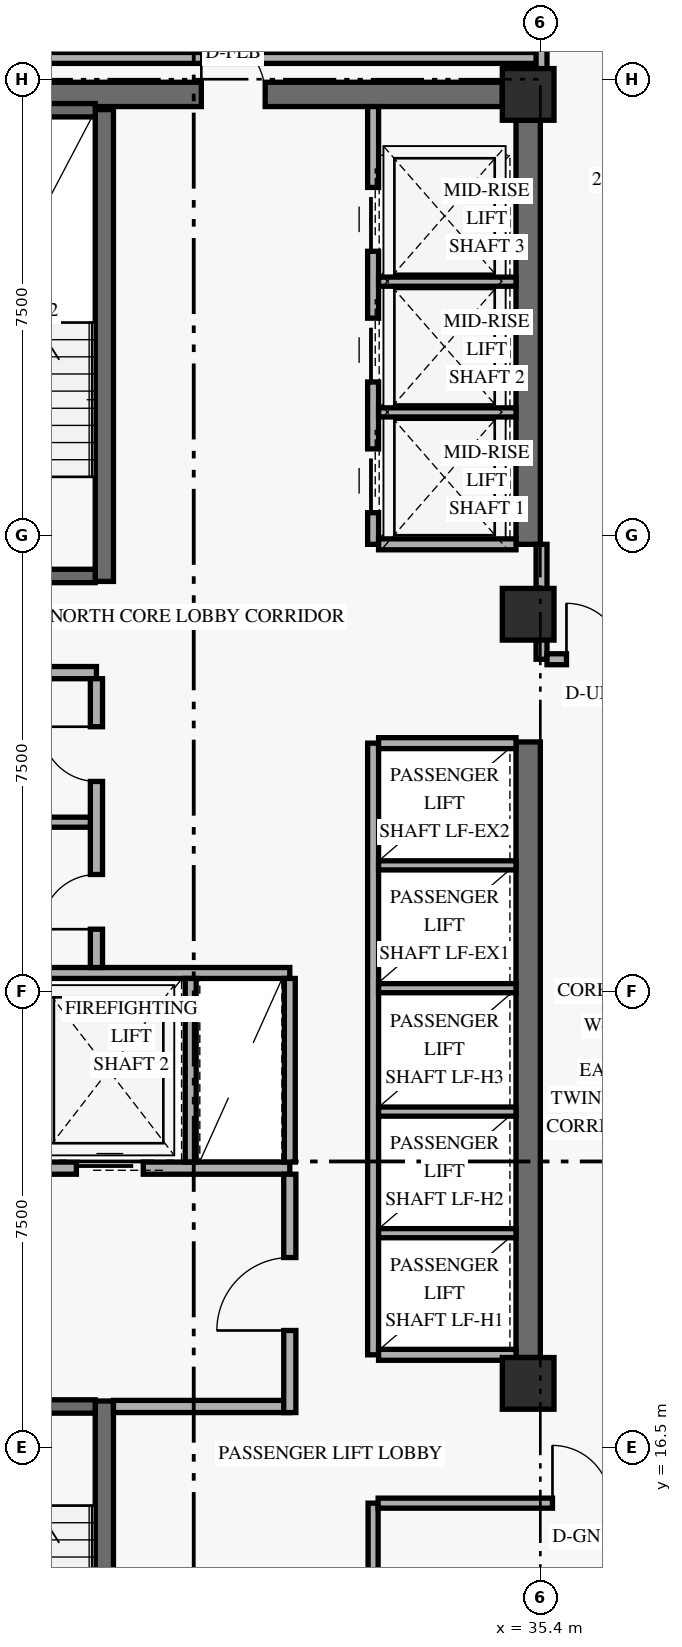
"""IFC4 building model, lengths in metres.
Left out: names, types, materials, properties, quantities, classifications, styles, units other than length and angle.
Written with IfcOpenShell. Run it as: python <this file> out.ifc"""

import sys

from ifc_helpers import new_model, si_unit, direction, frame, frame_2d, origin, origin_2d, place, context, subcontext, project, spatial, rectangle, extrude, element, fill, save


model = new_model("IFC4")
c1 = context("Model", 3, precision=1e-05, world=origin(), true_north=direction((0.0, 1.0)))
c2 = subcontext(c1, "Body", "Model", "MODEL_VIEW")
j1 = project(units=[si_unit("LENGTHUNIT", "METRE"), si_unit("PLANEANGLEUNIT", "RADIAN")], contexts=[c1])
p1 = place(None, origin())
s1 = spatial("IfcSite", under=j1, at=p1, CompositionType="ELEMENT")
p2 = place(p1, origin())
s2 = spatial("IfcBuilding", under=s1, at=p2, CompositionType="ELEMENT")
p3 = place(p2, frame((0.0, 0.0, 132.0)))
s3 = spatial("IfcBuildingStorey", under=s2, at=p3, CompositionType="ELEMENT", Elevation=132.0)
p4 = place(p3, frame((35.2, 17.975, 0.0), z_axis=(0.0, 0.0, 1.0), x_axis=(0.0, 1.0, 0.0)))
e1 = element("IfcWall", 1, at=p4, inside=s3, PredefinedType="SHEAR", context=c2, shape_type="SweptSolid", body=[
    extrude(rectangle(XDim=10.125, YDim=0.4, at=frame_2d((5.062, 0.0))), origin(), (0.0, 0.0, 1.0), 2.689),
])
p5 = place(p3, frame((35.2, 31.35, 0.0), z_axis=(0.0, 0.0, 1.0), x_axis=(0.0, 1.0, 0.0)))
e2 = element("IfcWall", 2, at=p5, inside=s3, PredefinedType="SHEAR", context=c2, shape_type="SweptSolid", body=[
    extrude(rectangle(XDim=6.975, YDim=0.4, at=frame_2d((3.487, 0.0))), origin(), (0.0, 0.0, 1.0), 2.689),
])
p6 = place(p3, frame((24.625, 38.75, 0.0), z_axis=(0.0, 0.0, 1.0), x_axis=(1.0, 0.0, 0.0)))
e3 = element("IfcWall", 3, at=p6, inside=s3, PredefinedType="SHEAR", context=c2, shape_type="SweptSolid", body=[
    extrude(rectangle(XDim=10.15, YDim=0.4, at=frame_2d((5.075, 0.0))), origin(), (0.0, 0.0, 1.0), 3.3),
])
p7 = place(p6, frame((5.2, 0.0, 0.0)))
e4 = element("IfcOpeningElement", 4, at=p7, cuts=e3, PredefinedType="OPENING", context=c2, shape_type="SweptSolid", body=[
    extrude(rectangle(XDim=1.05, YDim=2.15, at=frame_2d((0.525, 1.075))), frame((0.0, 0.21, 0.0), z_axis=(0.0, -1.0, 0.0), x_axis=(1.0, 0.0, 0.0)), (0.0, 0.0, 1.0), 0.42),
])
p8 = place(p3, frame((28.23, 9.5, 0.0), z_axis=(0.0, 0.0, 1.0), x_axis=(0.0, 1.0, 0.0)))
e5 = element("IfcWall", 5, at=p8, inside=s3, PredefinedType="SHEAR", context=c2, shape_type="SweptSolid", body=[
    extrude(rectangle(XDim=7.76, YDim=0.3, at=frame_2d((3.88, 0.0))), origin(), (0.0, 0.0, 1.0), 3.3),
])
p9 = place(p3, frame((24.92, 17.17, 0.0), z_axis=(0.0, 0.0, 1.0), x_axis=(1.0, 0.0, 0.0)))
e6 = element("IfcWall", 6, at=p9, inside=s3, PredefinedType="SHEAR", context=c2, shape_type="SweptSolid", body=[
    extrude(rectangle(XDim=3.16, YDim=0.22, at=frame_2d((1.58, 0.0))), origin(), (0.0, 0.0, 1.0), 3.3),
])
p10 = place(p9, frame((0.78, 0.0, 0.0)))
e7 = element("IfcOpeningElement", 7, at=p10, cuts=e6, PredefinedType="OPENING", context=c2, shape_type="SweptSolid", body=[
    extrude(rectangle(XDim=1.05, YDim=2.15, at=frame_2d((0.525, 1.075))), frame((0.0, 0.12, 0.0), z_axis=(0.0, -1.0, 0.0), x_axis=(1.0, 0.0, 0.0)), (0.0, 0.0, 1.0), 0.24),
])
p11 = place(p3, frame((28.23, 30.74, 0.0), z_axis=(0.0, 0.0, 1.0), x_axis=(0.0, 1.0, 0.0)))
e8 = element("IfcWall", 8, at=p11, inside=s3, PredefinedType="SHEAR", context=c2, shape_type="SweptSolid", body=[
    extrude(rectangle(XDim=7.76, YDim=0.3, at=frame_2d((3.88, 0.0))), origin(), (0.0, 0.0, 1.0), 3.3),
])
p12 = place(p3, frame((24.92, 30.83, 0.0), z_axis=(0.0, 0.0, 1.0), x_axis=(1.0, 0.0, 0.0)))
e9 = element("IfcWall", 9, at=p12, inside=s3, PredefinedType="SHEAR", context=c2, shape_type="SweptSolid", body=[
    extrude(rectangle(XDim=3.16, YDim=0.22, at=frame_2d((1.58, 0.0))), origin(), (0.0, 0.0, 1.0), 3.3),
])
p13 = place(p12, frame((0.78, 0.0, 0.0)))
e10 = element("IfcOpeningElement", 10, at=p13, cuts=e9, PredefinedType="OPENING", context=c2, shape_type="SweptSolid", body=[
    extrude(rectangle(XDim=1.05, YDim=2.15, at=frame_2d((0.525, 1.075))), frame((0.0, 0.12, 0.0), z_axis=(0.0, -1.0, 0.0), x_axis=(1.0, 0.0, 0.0)), (0.0, 0.0, 1.0), 0.24),
])
p14 = place(p3, frame((24.92, 38.49, 0.0), z_axis=(0.0, 0.0, 1.0), x_axis=(1.0, 0.0, 0.0)))
e11 = element("IfcWall", 11, at=p14, inside=s3, PredefinedType="SHEAR", context=c2, shape_type="SweptSolid", body=[
    extrude(rectangle(XDim=3.16, YDim=0.22, at=frame_2d((1.58, 0.0))), origin(), (0.0, 0.0, 1.0), 3.3),
])
for number, where, z_axis, x_axis in (
    (12, (35.2, 17.55, 0.0), (0.0, 0.0, 1.0), (1.0, 0.0, 0.0)),
    (13, (35.2, 30.2, 0.0), (0.0, 0.0, 1.0), (1.0, 0.0, 0.0)),
    (14, (35.2, 38.75, 0.0), (0.0, 0.0, 1.0), (1.0, 0.0, 0.0)),
):
    element("IfcColumn", number, at=place(p3, frame(where, z_axis=z_axis, x_axis=x_axis)), inside=s3, PredefinedType="COLUMN", context=c2, shape_type="SweptSolid", body=[
        extrude(rectangle(XDim=0.85, YDim=0.85, at=origin_2d()), origin(), (0.0, 0.0, 1.0), 3.6),
    ])
p15 = place(p3, frame((24.45, 21.09, 0.0), z_axis=(0.0, 0.0, 1.0), x_axis=(1.0, 0.0, 0.0)))
e15 = element("IfcWall", 15, at=p15, inside=s3, PredefinedType="STANDARD", context=c2, shape_type="SweptSolid", body=[
    extrude(rectangle(XDim=6.83, YDim=0.2, at=frame_2d((3.415, 0.0))), origin(), (0.0, 0.0, 1.0), 3.3),
])
p16 = place(p15, frame((0.72, 0.0, 0.0)))
e16 = element("IfcOpeningElement", 16, at=p16, cuts=e15, PredefinedType="OPENING", context=c2, shape_type="SweptSolid", body=[
    extrude(rectangle(XDim=1.1, YDim=2.2, at=frame_2d((0.55, 1.1))), frame((0.0, 0.11, 0.0), z_axis=(0.0, -1.0, 0.0), x_axis=(1.0, 0.0, 0.0)), (0.0, 0.0, 1.0), 0.22),
])
p17 = place(p15, frame((3.32, 0.0, 0.0)))
e17 = element("IfcOpeningElement", 17, at=p17, cuts=e15, PredefinedType="OPENING", context=c2, shape_type="SweptSolid", body=[
    extrude(rectangle(XDim=1.1, YDim=2.2, at=frame_2d((0.55, 1.1))), frame((0.0, 0.11, 0.0), z_axis=(0.0, -1.0, 0.0), x_axis=(1.0, 0.0, 0.0)), (0.0, 0.0, 1.0), 0.22),
])
p18 = place(p3, frame((28.38, 17.17, 0.0), z_axis=(0.0, 0.0, 1.0), x_axis=(1.0, 0.0, 0.0)))
e18 = element("IfcWall", 18, at=p18, inside=s3, PredefinedType="STANDARD", context=c2, shape_type="SweptSolid", body=[
    extrude(rectangle(XDim=2.9, YDim=0.2, at=frame_2d((1.45, 0.0))), origin(), (0.0, 0.0, 1.0), 3.3),
])
p19 = place(p3, frame((31.28, 17.07, 0.0), z_axis=(0.0, 0.0, 1.0), x_axis=(0.0, 1.0, 0.0)))
e19 = element("IfcWall", 19, at=p19, inside=s3, PredefinedType="STANDARD", context=c2, shape_type="SweptSolid", body=[
    extrude(rectangle(XDim=3.92, YDim=0.2, at=frame_2d((1.96, 0.0))), origin(), (0.0, 0.0, 1.0), 2.671),
])
p20 = place(p19, frame((1.35, 0.0, 0.0)))
e20 = element("IfcOpeningElement", 20, at=p20, cuts=e19, PredefinedType="OPENING", context=c2, shape_type="SweptSolid", body=[
    extrude(rectangle(XDim=1.2, YDim=2.15, at=frame_2d((0.6, 1.075))), frame((0.0, 0.11, 0.0), z_axis=(0.0, -1.0, 0.0), x_axis=(1.0, 0.0, 0.0)), (0.0, 0.0, 1.0), 0.22),
])
p21 = place(p3, frame((24.45, 24.3, 0.0), z_axis=(0.0, 0.0, 1.0), x_axis=(1.0, 0.0, 0.0)))
e21 = element("IfcWall", 21, at=p21, inside=s3, PredefinedType="STANDARD", context=c2, shape_type="SweptSolid", body=[
    extrude(rectangle(XDim=6.83, YDim=0.18, at=frame_2d((3.415, 0.0))), origin(), (0.0, 0.0, 1.0), 3.3),
])
for number, where, z_axis, x_axis in (
    (22, (29.65, 21.19, 0.0), (0.0, 0.0, 1.0), (0.0, 1.0, 0.0)),
    (23, (31.28, 21.19, 0.0), (0.0, 0.0, 1.0), (0.0, 1.0, 0.0)),
):
    element("IfcWall", number, at=place(p3, frame(where, z_axis=z_axis, x_axis=x_axis)), inside=s3, PredefinedType="STANDARD", context=c2, shape_type="SweptSolid", body=[
        extrude(rectangle(XDim=3.02, YDim=0.18, at=frame_2d((1.51, 0.0))), origin(), (0.0, 0.0, 1.0), 3.3),
    ])
p22 = place(p3, frame((24.45, 29.24, 0.0), z_axis=(0.0, 0.0, 1.0), x_axis=(1.0, 0.0, 0.0)))
e24 = element("IfcWall", 24, at=p22, inside=s3, PredefinedType="STANDARD", context=c2, shape_type="SweptSolid", body=[
    extrude(rectangle(XDim=3.65, YDim=0.2, at=frame_2d((1.825, 0.0))), origin(), (0.0, 0.0, 1.0), 3.3),
])
p23 = place(p3, frame((28.1, 24.39, 0.0), z_axis=(0.0, 0.0, 1.0), x_axis=(0.0, 1.0, 0.0)))
e25 = element("IfcWall", 25, at=p23, inside=s3, PredefinedType="STANDARD", context=c2, shape_type="SweptSolid", body=[
    extrude(rectangle(XDim=4.75, YDim=0.2, at=frame_2d((2.375, 0.0))), origin(), (0.0, 0.0, 1.0), 3.3),
])
p24 = place(p23, frame((0.63, 0.0, 0.0)))
e26 = element("IfcOpeningElement", 26, at=p24, cuts=e25, PredefinedType="OPENING", context=c2, shape_type="SweptSolid", body=[
    extrude(rectangle(XDim=0.9, YDim=2.1, at=frame_2d((0.45, 1.05))), frame((0.0, 0.11, 0.0), z_axis=(0.0, -1.0, 0.0), x_axis=(1.0, 0.0, 0.0)), (0.0, 0.0, 1.0), 0.22),
])
p25 = place(p23, frame((3.06, 0.0, 0.0)))
e27 = element("IfcOpeningElement", 27, at=p25, cuts=e25, PredefinedType="OPENING", context=c2, shape_type="SweptSolid", body=[
    extrude(rectangle(XDim=0.9, YDim=2.1, at=frame_2d((0.45, 1.05))), frame((0.0, 0.11, 0.0), z_axis=(0.0, -1.0, 0.0), x_axis=(1.0, 0.0, 0.0)), (0.0, 0.0, 1.0), 0.22),
])
p26 = place(p3, frame((24.45, 26.78, 0.0), z_axis=(0.0, 0.0, 1.0), x_axis=(1.0, 0.0, 0.0)))
e28 = element("IfcWall", 28, at=p26, inside=s3, PredefinedType="PARTITIONING", context=c2, shape_type="SweptSolid", body=[
    extrude(rectangle(XDim=3.55, YDim=0.165, at=frame_2d((1.775, 0.0))), origin(), (0.0, 0.0, 1.0), 3.3),
])
p27 = place(p3, frame((32.65, 18.02, 0.0), z_axis=(0.0, 0.0, 1.0), x_axis=(0.0, 1.0, 0.0)))
e29 = element("IfcWall", 29, at=p27, inside=s3, PredefinedType="STANDARD", context=c2, shape_type="SweptSolid", body=[
    extrude(rectangle(XDim=10.06, YDim=0.18, at=frame_2d((5.03, 0.0))), origin(), (0.0, 0.0, 1.0), 3.3),
])
for number, where, z_axis, x_axis in (
    (30, (32.74, 18.02, 0.0), (0.0, 0.0, 1.0), (1.0, 0.0, 0.0)),
    (31, (32.74, 28.08, 0.0), (0.0, 0.0, 1.0), (1.0, 0.0, 0.0)),
):
    element("IfcWall", number, at=place(p3, frame(where, z_axis=z_axis, x_axis=x_axis)), inside=s3, PredefinedType="STANDARD", context=c2, shape_type="SweptSolid", body=[
        extrude(rectangle(XDim=2.26, YDim=0.18, at=frame_2d((1.13, 0.0))), origin(), (0.0, 0.0, 1.0), 3.3),
    ])
for number, where, z_axis, x_axis in (
    (32, (32.74, 20.02, 0.0), (0.0, 0.0, 1.0), (1.0, 0.0, 0.0)),
    (33, (32.74, 22.02, 0.0), (0.0, 0.0, 1.0), (1.0, 0.0, 0.0)),
    (34, (32.74, 24.05, 0.0), (0.0, 0.0, 1.0), (1.0, 0.0, 0.0)),
    (35, (32.74, 26.07, 0.0), (0.0, 0.0, 1.0), (1.0, 0.0, 0.0)),
):
    element("IfcWall", number, at=place(p3, frame(where, z_axis=z_axis, x_axis=x_axis)), inside=s3, PredefinedType="STANDARD", context=c2, shape_type="SweptSolid", body=[
        extrude(rectangle(XDim=2.26, YDim=0.15, at=frame_2d((1.13, 0.0))), origin(), (0.0, 0.0, 1.0), 3.3),
    ])
p28 = place(p3, frame((32.65, 31.35, 0.0), z_axis=(0.0, 0.0, 1.0), x_axis=(0.0, 1.0, 0.0)))
e36 = element("IfcWall", 36, at=p28, inside=s3, PredefinedType="STANDARD", context=c2, shape_type="SweptSolid", body=[
    extrude(rectangle(XDim=7.2, YDim=0.18, at=frame_2d((3.6, 0.0))), origin(), (0.0, 0.0, 1.0), 3.3),
])
p29 = place(p28, frame((0.52, 0.0, 0.0)))
e37 = element("IfcOpeningElement", 37, at=p29, cuts=e36, PredefinedType="OPENING", context=c2, shape_type="SweptSolid", body=[
    extrude(rectangle(XDim=1.05, YDim=2.2, at=frame_2d((0.525, 1.1))), frame((0.0, 0.1, 0.0), z_axis=(0.0, -1.0, 0.0), x_axis=(1.0, 0.0, 0.0)), (0.0, 0.0, 1.0), 0.2),
])
p30 = place(p28, frame((2.67, 0.0, 0.0)))
e38 = element("IfcOpeningElement", 38, at=p30, cuts=e36, PredefinedType="OPENING", context=c2, shape_type="SweptSolid", body=[
    extrude(rectangle(XDim=1.05, YDim=2.2, at=frame_2d((0.525, 1.1))), frame((0.0, 0.1, 0.0), z_axis=(0.0, -1.0, 0.0), x_axis=(1.0, 0.0, 0.0)), (0.0, 0.0, 1.0), 0.2),
])
p31 = place(p28, frame((4.82, 0.0, 0.0)))
e39 = element("IfcOpeningElement", 39, at=p31, cuts=e36, PredefinedType="OPENING", context=c2, shape_type="SweptSolid", body=[
    extrude(rectangle(XDim=1.05, YDim=2.2, at=frame_2d((0.525, 1.1))), frame((0.0, 0.1, 0.0), z_axis=(0.0, -1.0, 0.0), x_axis=(1.0, 0.0, 0.0)), (0.0, 0.0, 1.0), 0.2),
])
p32 = place(p3, frame((32.74, 31.35, 0.0), z_axis=(0.0, 0.0, 1.0), x_axis=(1.0, 0.0, 0.0)))
e40 = element("IfcWall", 40, at=p32, inside=s3, PredefinedType="STANDARD", context=c2, shape_type="SweptSolid", body=[
    extrude(rectangle(XDim=2.26, YDim=0.18, at=frame_2d((1.13, 0.0))), origin(), (0.0, 0.0, 1.0), 3.3),
])
for number, where, z_axis, x_axis in (
    (41, (32.74, 33.52, 0.0), (0.0, 0.0, 1.0), (1.0, 0.0, 0.0)),
    (42, (32.74, 35.67, 0.0), (0.0, 0.0, 1.0), (1.0, 0.0, 0.0)),
):
    element("IfcWall", number, at=place(p3, frame(where, z_axis=z_axis, x_axis=x_axis)), inside=s3, PredefinedType="STANDARD", context=c2, shape_type="SweptSolid", body=[
        extrude(rectangle(XDim=2.26, YDim=0.15, at=frame_2d((1.13, 0.0))), origin(), (0.0, 0.0, 1.0), 3.3),
    ])
p33 = place(p3, frame((32.65, 9.5, 0.0), z_axis=(0.0, 0.0, 1.0), x_axis=(0.0, 1.0, 0.0)))
e43 = element("IfcWall", 43, at=p33, inside=s3, PredefinedType="PARTITIONING", context=c2, shape_type="SweptSolid", body=[
    extrude(rectangle(XDim=6.08, YDim=0.165, at=frame_2d((3.04, 0.0))), origin(), (0.0, 0.0, 1.0), 3.3),
])
p34 = place(p3, frame((32.732, 15.58, 0.0), z_axis=(0.0, 0.0, 1.0), x_axis=(1.0, 0.0, 0.0)))
e44 = element("IfcWall", 44, at=p34, inside=s3, PredefinedType="PARTITIONING", context=c2, shape_type="SweptSolid", body=[
    extrude(rectangle(XDim=4.818, YDim=0.165, at=frame_2d((2.409, 0.0))), origin(), (0.0, 0.0, 1.0), 2.671),
])
p35 = place(p34, frame((2.867, 0.0, 0.0)))
e45 = element("IfcOpeningElement", 45, at=p35, cuts=e44, PredefinedType="OPENING", context=c2, shape_type="SweptSolid", body=[
    extrude(rectangle(XDim=0.95, YDim=2.15, at=frame_2d((0.475, 1.075))), frame((0.0, 0.093, 0.0), z_axis=(0.0, -1.0, 0.0), x_axis=(1.0, 0.0, 0.0)), (0.0, 0.0, 1.0), 0.185),
])
p36 = place(p3, frame((35.42, 29.46, 0.0), z_axis=(0.0, 0.0, 1.0), x_axis=(0.0, 1.0, 0.0)))
e46 = element("IfcWall", 46, at=p36, inside=s3, PredefinedType="STANDARD", context=c2, shape_type="SweptSolid", body=[
    extrude(rectangle(XDim=1.89, YDim=0.18, at=frame_2d((0.945, 0.0))), origin(), (0.0, 0.0, 1.0), 2.671),
])
p37 = place(p3, frame((35.51, 29.46, 0.0), z_axis=(0.0, 0.0, 1.0), x_axis=(1.0, 0.0, 0.0)))
e47 = element("IfcWall", 47, at=p37, inside=s3, PredefinedType="STANDARD", context=c2, shape_type="SweptSolid", body=[
    extrude(rectangle(XDim=11.69, YDim=0.18, at=frame_2d((5.845, 0.0))), origin(), (0.0, 0.0, 1.0), 2.671),
])
p38 = place(p37, frame((0.32, 0.0, 0.0)))
e48 = element("IfcOpeningElement", 48, at=p38, cuts=e47, PredefinedType="OPENING", context=c2, shape_type="SweptSolid", body=[
    extrude(rectangle(XDim=0.92, YDim=2.15, at=frame_2d((0.46, 1.075))), frame((0.0, 0.1, 0.0), z_axis=(0.0, -1.0, 0.0), x_axis=(1.0, 0.0, 0.0)), (0.0, 0.0, 1.0), 0.2),
])
p39 = place(p3, frame((23.85, 39.35, 0.0), z_axis=(0.0, 0.0, 1.0), x_axis=(1.0, 0.0, 0.0)))
e49 = element("IfcWall", 49, at=p39, inside=s3, PredefinedType="STANDARD", context=c2, shape_type="SweptSolid", body=[
    extrude(rectangle(XDim=11.57, YDim=0.18, at=frame_2d((5.785, 0.0))), origin(), (0.0, 0.0, 1.0), 2.671),
])
p40 = place(p3, frame((35.42, 38.75, 0.0), z_axis=(0.0, 0.0, 1.0), x_axis=(0.0, 1.0, 0.0)))
e50 = element("IfcWall", 50, at=p40, inside=s3, PredefinedType="PARTITIONING", context=c2, shape_type="SweptSolid", body=[
    extrude(rectangle(XDim=6.27, YDim=0.18, at=frame_2d((3.135, 0.0))), origin(), (0.0, 0.0, 1.0), 2.671),
])
p41 = place(p17, origin())
e51 = element("IfcDoor", 51, at=p41, inside=s3, OperationType="SLIDING_TO_LEFT", PredefinedType="DOOR", context=c2, shape_type="SweptSolid", body=[
    extrude(rectangle(XDim=1.1, YDim=2.2, at=frame_2d((0.55, 1.1))), frame((0.0, 0.025, 0.0), z_axis=(0.0, -1.0, 0.0), x_axis=(1.0, 0.0, 0.0)), (0.0, 0.0, 1.0), 0.05),
])
fill(e17, e51)
p42 = place(p20, origin())
e52 = element("IfcDoor", 52, at=p42, inside=s3, OperationType="SINGLE_SWING_LEFT", PredefinedType="DOOR", context=c2, shape_type="SweptSolid", body=[
    extrude(rectangle(XDim=1.2, YDim=2.15, at=frame_2d((0.6, 1.075))), frame((0.0, 0.025, 0.0), z_axis=(0.0, -1.0, 0.0), x_axis=(1.0, 0.0, 0.0)), (0.0, 0.0, 1.0), 0.05),
])
fill(e20, e52)
p43 = place(p24, origin())
e53 = element("IfcDoor", 53, at=p43, inside=s3, OperationType="SINGLE_SWING_LEFT", PredefinedType="DOOR", context=c2, shape_type="SweptSolid", body=[
    extrude(rectangle(XDim=0.9, YDim=2.1, at=frame_2d((0.45, 1.05))), frame((0.0, 0.025, 0.0), z_axis=(0.0, -1.0, 0.0), x_axis=(1.0, 0.0, 0.0)), (0.0, 0.0, 1.0), 0.05),
])
fill(e26, e53)
p44 = place(p25, origin())
e54 = element("IfcDoor", 54, at=p44, inside=s3, OperationType="SINGLE_SWING_RIGHT", PredefinedType="DOOR", context=c2, shape_type="SweptSolid", body=[
    extrude(rectangle(XDim=0.9, YDim=2.1, at=frame_2d((0.45, 1.05))), frame((0.0, 0.025, 0.0), z_axis=(0.0, -1.0, 0.0), x_axis=(1.0, 0.0, 0.0)), (0.0, 0.0, 1.0), 0.05),
])
fill(e27, e54)
p45 = place(p29, origin())
e55 = element("IfcDoor", 55, at=p45, inside=s3, OperationType="SLIDING_TO_LEFT", PredefinedType="DOOR", context=c2, shape_type="SweptSolid", body=[
    extrude(rectangle(XDim=1.05, YDim=2.2, at=frame_2d((0.525, 1.1))), frame((0.0, 0.025, 0.0), z_axis=(0.0, -1.0, 0.0), x_axis=(1.0, 0.0, 0.0)), (0.0, 0.0, 1.0), 0.05),
])
fill(e37, e55)
p46 = place(p30, origin())
e56 = element("IfcDoor", 56, at=p46, inside=s3, OperationType="SLIDING_TO_LEFT", PredefinedType="DOOR", context=c2, shape_type="SweptSolid", body=[
    extrude(rectangle(XDim=1.05, YDim=2.2, at=frame_2d((0.525, 1.1))), frame((0.0, 0.025, 0.0), z_axis=(0.0, -1.0, 0.0), x_axis=(1.0, 0.0, 0.0)), (0.0, 0.0, 1.0), 0.05),
])
fill(e38, e56)
p47 = place(p31, origin())
e57 = element("IfcDoor", 57, at=p47, inside=s3, OperationType="SLIDING_TO_LEFT", PredefinedType="DOOR", context=c2, shape_type="SweptSolid", body=[
    extrude(rectangle(XDim=1.05, YDim=2.2, at=frame_2d((0.525, 1.1))), frame((0.0, 0.025, 0.0), z_axis=(0.0, -1.0, 0.0), x_axis=(1.0, 0.0, 0.0)), (0.0, 0.0, 1.0), 0.05),
])
fill(e39, e57)
p48 = place(p35, origin())
e58 = element("IfcDoor", 58, at=p48, inside=s3, OperationType="SINGLE_SWING_LEFT", PredefinedType="DOOR", context=c2, shape_type="SweptSolid", body=[
    extrude(rectangle(XDim=0.95, YDim=2.15, at=frame_2d((0.475, 1.075))), frame((0.0, 0.025, 0.0), z_axis=(0.0, -1.0, 0.0), x_axis=(1.0, 0.0, 0.0)), (0.0, 0.0, 1.0), 0.05),
])
fill(e45, e58)
p49 = place(p7, frame((1.05, 0.0, 0.0), z_axis=(0.0, 0.0, 1.0), x_axis=(-1.0, 0.0, 0.0)))
e59 = element("IfcDoor", 59, at=p49, inside=s3, OperationType="SINGLE_SWING_RIGHT", PredefinedType="DOOR", context=c2, shape_type="SweptSolid", body=[
    extrude(rectangle(XDim=1.05, YDim=2.15, at=frame_2d((0.525, 1.075))), frame((0.0, 0.025, 0.0), z_axis=(0.0, -1.0, 0.0), x_axis=(1.0, 0.0, 0.0)), (0.0, 0.0, 1.0), 0.05),
])
fill(e4, e59)
p50 = place(p38, origin())
e60 = element("IfcDoor", 60, at=p50, inside=s3, OperationType="SINGLE_SWING_LEFT", PredefinedType="DOOR", context=c2, shape_type="SweptSolid", body=[
    extrude(rectangle(XDim=0.92, YDim=2.15, at=frame_2d((0.46, 1.075))), frame((0.0, 0.025, 0.0), z_axis=(0.0, -1.0, 0.0), x_axis=(1.0, 0.0, 0.0)), (0.0, 0.0, 1.0), 0.05),
])
fill(e48, e60)
save(model, sys.argv[1])
